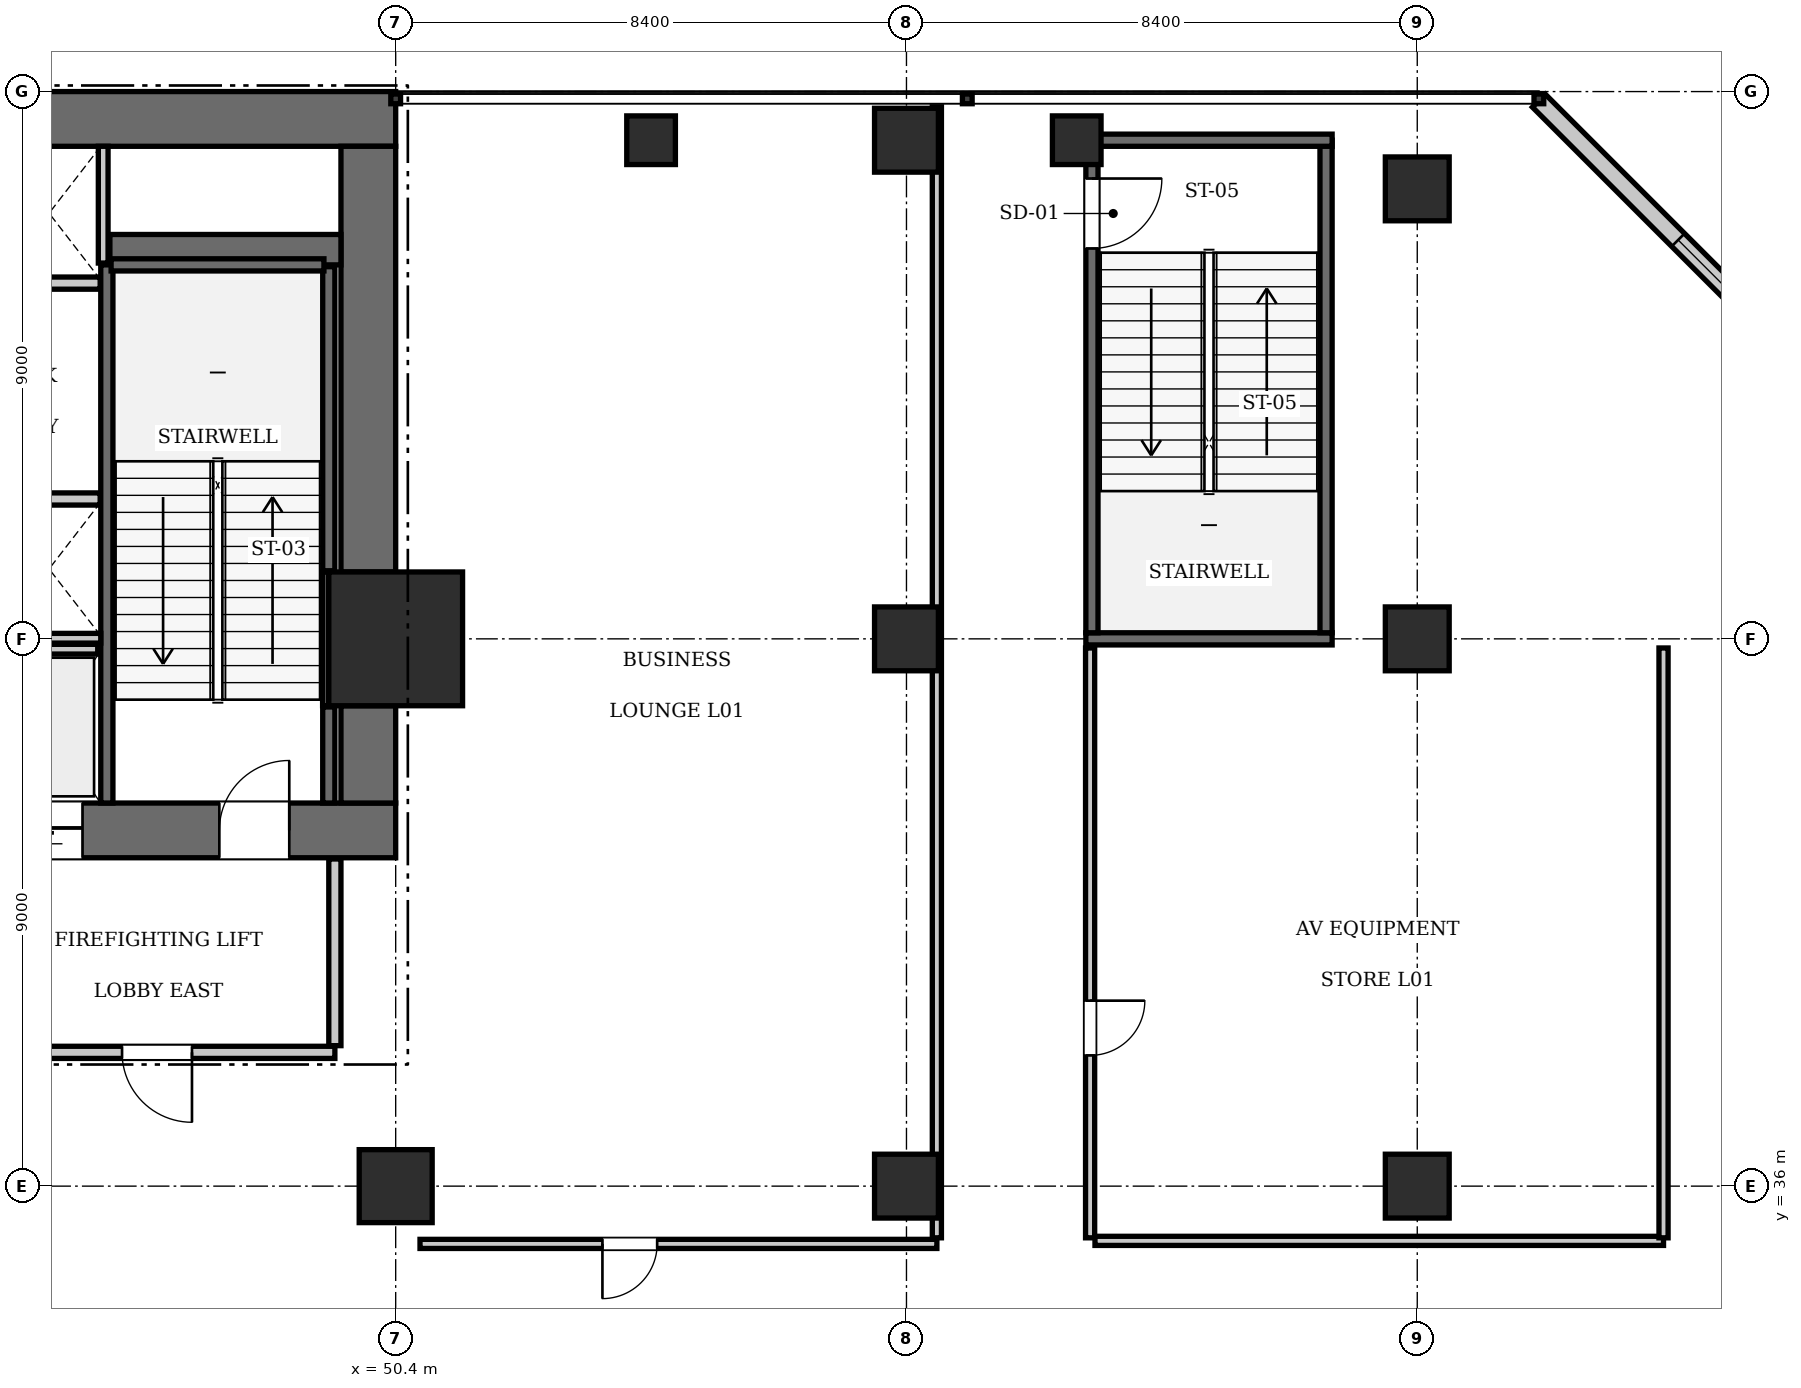
"""IFC4 building model, lengths in metres.
Left out: names, types, materials, properties, quantities, classifications, styles, units other than length and angle.
Written with IfcOpenShell. Run it as: python <this file> out.ifc"""

import sys

from ifc_helpers import new_model, si_unit, direction, frame, frame_2d, origin, origin_2d, place, context, subcontext, project, spatial, rectangle, extrude, element, fill, save


model = new_model("IFC4")
c1 = context("Model", 3, precision=1e-05, world=origin(), true_north=direction((0.0, 1.0)))
c2 = subcontext(c1, "Body", "Model", "MODEL_VIEW")
j1 = project(units=[si_unit("LENGTHUNIT", "METRE"), si_unit("PLANEANGLEUNIT", "RADIAN")], contexts=[c1])
p1 = place(None, origin())
s1 = spatial("IfcSite", under=j1, at=p1, CompositionType="ELEMENT")
p2 = place(p1, origin())
s2 = spatial("IfcBuilding", under=s1, at=p2, CompositionType="ELEMENT")
p3 = place(p2, frame((0.0, 0.0, 5.6)))
s3 = spatial("IfcBuildingStorey", under=s2, at=p3, CompositionType="ELEMENT", Elevation=5.6)
p4 = place(p3, frame((50.4, 45.0, 0.0), z_axis=(0.0, 0.0, 1.0), x_axis=(1.0, 0.0, 0.0)))
e1 = element("IfcColumn", 1, at=p4, inside=s3, PredefinedType="COLUMN", context=c2, shape_type="SweptSolid", body=[
    extrude(rectangle(XDim=2.2, YDim=2.2, at=origin_2d()), origin(), (0.0, 0.0, 1.0), 5.25),
])
p5 = place(p3, frame((25.2, 53.55, 0.0), z_axis=(0.0, 0.0, 1.0), x_axis=(1.0, 0.0, 0.0)))
e2 = element("IfcWall", 2, at=p5, inside=s3, PredefinedType="SHEAR", context=c2, shape_type="SweptSolid", body=[
    extrude(rectangle(XDim=25.2, YDim=0.9, at=frame_2d((12.6, 0.0))), origin(), (0.0, 0.0, 1.0), 5.25),
])
p6 = place(p3, frame((43.6, 41.85, 0.0), z_axis=(0.0, 0.0, 1.0), x_axis=(1.0, 0.0, 0.0)))
e3 = element("IfcWall", 3, at=p6, inside=s3, PredefinedType="SHEAR", context=c2, shape_type="SweptSolid", body=[
    extrude(rectangle(XDim=6.8, YDim=0.9, at=frame_2d((3.4, 0.0))), origin(), (0.0, 0.0, 1.0), 5.25),
])
p7 = place(p6, frame((3.9, 0.0, 0.0)))
e4 = element("IfcOpeningElement", 4, at=p7, cuts=e3, PredefinedType="OPENING", context=c2, shape_type="SweptSolid", body=[
    extrude(rectangle(XDim=1.15, YDim=2.15, at=frame_2d((0.575, 1.075))), frame((0.0, 0.46, 0.0), z_axis=(0.0, -1.0, 0.0), x_axis=(1.0, 0.0, 0.0)), (0.0, 0.0, 1.0), 0.92),
])
p8 = place(p6, frame((0.55, 0.0, 0.0)))
e5 = element("IfcOpeningElement", 5, at=p8, cuts=e3, PredefinedType="OPENING", context=c2, shape_type="SweptSolid", body=[
    extrude(rectangle(XDim=1.1, YDim=2.2, at=frame_2d((0.55, 1.1))), frame((0.0, 0.46, 0.0), z_axis=(0.0, -1.0, 0.0), x_axis=(1.0, 0.0, 0.0)), (0.0, 0.0, 1.0), 0.92),
])
p9 = place(p3, frame((49.95, 42.3, 0.0), z_axis=(0.0, 0.0, 1.0), x_axis=(0.0, 1.0, 0.0)))
e6 = element("IfcWall", 6, at=p9, inside=s3, PredefinedType="SHEAR", context=c2, shape_type="SweptSolid", body=[
    extrude(rectangle(XDim=1.6, YDim=0.9, at=frame_2d((0.8, 0.0))), origin(), (0.0, 0.0, 1.0), 5.25),
])
p10 = place(p3, frame((49.95, 46.1, 0.0), z_axis=(0.0, 0.0, 1.0), x_axis=(0.0, 1.0, 0.0)))
e7 = element("IfcWall", 7, at=p10, inside=s3, PredefinedType="SHEAR", context=c2, shape_type="SweptSolid", body=[
    extrude(rectangle(XDim=7.0, YDim=0.9, at=frame_2d((3.5, 0.0))), origin(), (0.0, 0.0, 1.0), 5.25),
])
p11 = place(p3, frame((45.7, 51.4, 0.0), z_axis=(0.0, 0.0, 1.0), x_axis=(1.0, 0.0, 0.0)))
e8 = element("IfcWall", 8, at=p11, inside=s3, PredefinedType="SHEAR", context=c2, shape_type="SweptSolid", body=[
    extrude(rectangle(XDim=3.8, YDim=0.5, at=frame_2d((1.9, 0.0))), origin(), (0.0, 0.0, 1.0), 5.25),
])
p12 = place(p3, frame((50.4, 36.0, 0.0), z_axis=(0.0, 0.0, 1.0), x_axis=(1.0, 0.0, 0.0)))
e9 = element("IfcColumn", 9, at=p12, inside=s3, PredefinedType="COLUMN", context=c2, shape_type="SweptSolid", body=[
    extrude(rectangle(XDim=1.2, YDim=1.2, at=origin_2d()), origin(), (0.0, 0.0, 1.0), 5.25),
])
for number, where, z_axis, x_axis in (
    (10, (58.8, 36.0, 0.0), (0.0, 0.0, 1.0), (1.0, 0.0, 0.0)),
    (11, (58.8, 45.0, 0.0), (0.0, 0.0, 1.0), (1.0, 0.0, 0.0)),
    (12, (67.2, 36.0, 0.0), (0.0, 0.0, 1.0), (1.0, 0.0, 0.0)),
    (13, (67.2, 45.0, 0.0), (0.0, 0.0, 1.0), (1.0, 0.0, 0.0)),
    (14, (67.2, 52.4, 0.0), (0.0, 0.0, 1.0), (1.0, 0.0, 0.0)),
    (15, (58.8, 53.2, 0.0), (0.0, 0.0, 1.0), (1.0, 0.0, 0.0)),
):
    element("IfcColumn", number, at=place(p3, frame(where, z_axis=z_axis, x_axis=x_axis)), inside=s3, PredefinedType="COLUMN", context=c2, shape_type="SweptSolid", body=[
        extrude(rectangle(XDim=1.05, YDim=1.05, at=origin_2d()), origin(), (0.0, 0.0, 1.0), 5.25),
    ])
for number, where, z_axis, x_axis in (
    (16, (54.6, 53.2, 0.0), (0.0, 0.0, 1.0), (1.0, 0.0, 0.0)),
    (17, (61.6, 53.2, 0.0), (0.0, 0.0, 1.0), (1.0, 0.0, 0.0)),
):
    element("IfcColumn", number, at=place(p3, frame(where, z_axis=z_axis, x_axis=x_axis)), inside=s3, PredefinedType="PILASTER", context=c2, shape_type="SweptSolid", body=[
        extrude(rectangle(XDim=0.8, YDim=0.8, at=origin_2d()), origin(), (0.0, 0.0, 1.0), 5.25),
    ])
p13 = place(p3, frame((45.65, 42.3, 0.0), z_axis=(0.0, 0.0, 1.0), x_axis=(0.0, 1.0, 0.0)))
e18 = element("IfcWall", 18, at=p13, inside=s3, PredefinedType="SOLIDWALL", context=c2, shape_type="SweptSolid", body=[
    extrude(rectangle(XDim=8.85, YDim=0.2, at=frame_2d((4.425, 0.0))), origin(), (0.0, 0.0, 1.0), 4.97),
])
p14 = place(p3, frame((49.3, 42.3, 0.0), z_axis=(0.0, 0.0, 1.0), x_axis=(0.0, 1.0, 0.0)))
e19 = element("IfcWall", 19, at=p14, inside=s3, PredefinedType="SOLIDWALL", context=c2, shape_type="SweptSolid", body=[
    extrude(rectangle(XDim=1.58, YDim=0.2, at=frame_2d((0.79, 0.0))), origin(), (0.0, 0.0, 1.0), 4.97),
])
p15 = place(p3, frame((49.3, 46.12, 0.0), z_axis=(0.0, 0.0, 1.0), x_axis=(0.0, 1.0, 0.0)))
e20 = element("IfcWall", 20, at=p15, inside=s3, PredefinedType="SOLIDWALL", context=c2, shape_type="SweptSolid", body=[
    extrude(rectangle(XDim=5.0, YDim=0.2, at=frame_2d((2.5, 0.0))), origin(), (0.0, 0.0, 1.0), 4.97),
])
p16 = place(p3, frame((45.72, 51.15, 0.0), z_axis=(0.0, 0.0, 1.0), x_axis=(1.0, 0.0, 0.0)))
e21 = element("IfcWall", 21, at=p16, inside=s3, PredefinedType="SOLIDWALL", context=c2, shape_type="SweptSolid", body=[
    extrude(rectangle(XDim=3.5, YDim=0.2, at=frame_2d((1.75, 0.0))), origin(), (0.0, 0.0, 1.0), 4.97),
])
p17 = place(p3, frame((49.248, 43.9, 0.0), z_axis=(0.0, 0.0, 1.0), x_axis=(0.0, 1.0, 0.0)))
e22 = element("IfcWall", 22, at=p17, inside=s3, PredefinedType="SOLIDWALL", context=c2, shape_type="SweptSolid", body=[
    extrude(rectangle(XDim=2.2, YDim=0.1, at=frame_2d((1.1, 0.0))), origin(), (0.0, 0.0, 1.0), 4.97),
])
p18 = place(p3, frame((61.75, 45.0, 0.0), z_axis=(0.0, 0.0, 1.0), x_axis=(1.0, 0.0, 0.0)))
e23 = element("IfcWall", 23, at=p18, inside=s3, PredefinedType="SOLIDWALL", context=c2, shape_type="SweptSolid", body=[
    extrude(rectangle(XDim=4.05, YDim=0.2, at=frame_2d((2.025, 0.0))), origin(), (0.0, 0.0, 1.0), 4.335),
])
p19 = place(p3, frame((61.85, 45.1, 0.0), z_axis=(0.0, 0.0, 1.0), x_axis=(0.0, 1.0, 0.0)))
e24 = element("IfcWall", 24, at=p19, inside=s3, PredefinedType="SOLIDWALL", context=c2, shape_type="SweptSolid", body=[
    extrude(rectangle(XDim=8.1, YDim=0.2, at=frame_2d((4.05, 0.0))), origin(), (0.0, 0.0, 1.0), 4.97),
])
p20 = place(p19, frame((6.32, 0.0, 0.0)))
e25 = element("IfcOpeningElement", 25, at=p20, cuts=e24, PredefinedType="OPENING", context=c2, shape_type="SweptSolid", body=[
    extrude(rectangle(XDim=1.15, YDim=2.15, at=frame_2d((0.575, 1.075))), frame((0.0, 0.11, 0.0), z_axis=(0.0, -1.0, 0.0), x_axis=(1.0, 0.0, 0.0)), (0.0, 0.0, 1.0), 0.22),
])
p21 = place(p3, frame((65.7, 45.1, 0.0), z_axis=(0.0, 0.0, 1.0), x_axis=(0.0, 1.0, 0.0)))
e26 = element("IfcWall", 26, at=p21, inside=s3, PredefinedType="SOLIDWALL", context=c2, shape_type="SweptSolid", body=[
    extrude(rectangle(XDim=8.1, YDim=0.2, at=frame_2d((4.05, 0.0))), origin(), (0.0, 0.0, 1.0), 4.97),
])
p22 = place(p3, frame((61.75, 53.2, 0.0), z_axis=(0.0, 0.0, 1.0), x_axis=(1.0, 0.0, 0.0)))
e27 = element("IfcWall", 27, at=p22, inside=s3, PredefinedType="SOLIDWALL", context=c2, shape_type="SweptSolid", body=[
    extrude(rectangle(XDim=4.05, YDim=0.2, at=frame_2d((2.025, 0.0))), origin(), (0.0, 0.0, 1.0), 4.97),
])
for number, where, z_axis, x_axis in (
    (28, (43.86, 47.3, 0.0), (0.0, 0.0, 1.0), (1.0, 0.0, 0.0)),
    (29, (43.86, 50.85, 0.0), (0.0, 0.0, 1.0), (1.0, 0.0, 0.0)),
):
    element("IfcWall", number, at=place(p3, frame(where, z_axis=z_axis, x_axis=x_axis)), inside=s3, PredefinedType="SOLIDWALL", context=c2, shape_type="SweptSolid", body=[
        extrude(rectangle(XDim=1.68, YDim=0.2, at=frame_2d((0.84, 0.0))), origin(), (0.0, 0.0, 1.0), 4.97),
    ])
p23 = place(p3, frame((43.9, 44.83, 0.0), z_axis=(0.0, 0.0, 1.0), x_axis=(1.0, 0.0, 0.0)))
e30 = element("IfcWall", 30, at=p23, inside=s3, PredefinedType="SOLIDWALL", context=c2, shape_type="SweptSolid", body=[
    extrude(rectangle(XDim=1.6, YDim=0.16, at=frame_2d((0.8, 0.0))), origin(), (0.0, 0.0, 1.0), 4.97),
])
p24 = place(p3, frame((42.1, 45.01, 0.0), z_axis=(0.0, 0.0, 1.0), x_axis=(1.0, 0.0, 0.0)))
e31 = element("IfcWall", 31, at=p24, inside=s3, PredefinedType="SOLIDWALL", context=c2, shape_type="SweptSolid", body=[
    extrude(rectangle(XDim=3.45, YDim=0.16, at=frame_2d((1.725, 0.0))), origin(), (0.0, 0.0, 1.0), 4.97),
])
p25 = place(p3, frame((45.59, 51.18, 0.0), z_axis=(0.0, 0.0, 1.0), x_axis=(0.0, 1.0, 0.0)))
e32 = element("IfcWall", 32, at=p25, inside=s3, PredefinedType="SOLIDWALL", context=c2, shape_type="SweptSolid", body=[
    extrude(rectangle(XDim=1.92, YDim=0.16, at=frame_2d((0.96, 0.0))), origin(), (0.0, 0.0, 1.0), 4.97),
])
p26 = place(p3, frame((75.45, 47.6, 0.0), z_axis=(0.0, 0.0, 1.0), x_axis=(-0.707106781187, 0.707106781187, 0.0)))
e33 = element("IfcWall", 33, at=p26, inside=s3, PredefinedType="SOLIDWALL", context=c2, shape_type="SweptSolid", body=[
    extrude(rectangle(XDim=8.839, YDim=0.3, at=frame_2d((4.419, 0.0))), origin(), (0.0, 0.0, 1.0), 4.97),
])
p27 = place(p26, frame((3.2, 0.0, 0.9)))
e34 = element("IfcOpeningElement", 34, at=p27, cuts=e33, PredefinedType="OPENING", context=c2, shape_type="SweptSolid", body=[
    extrude(rectangle(XDim=2.4, YDim=2.6, at=frame_2d((1.2, 1.3))), frame((0.0, 0.16, 0.0), z_axis=(0.0, -1.0, 0.0), x_axis=(1.0, 0.0, 0.0)), (0.0, 0.0, 1.0), 0.32),
])
p28 = place(p3, frame((43.6, 38.2, 0.0), z_axis=(0.0, 0.0, 1.0), x_axis=(1.0, 0.0, 0.0)))
e35 = element("IfcWall", 35, at=p28, inside=s3, PredefinedType="PARTITIONING", context=c2, shape_type="SweptSolid", body=[
    extrude(rectangle(XDim=5.8, YDim=0.2, at=frame_2d((2.9, 0.0))), origin(), (0.0, 0.0, 1.0), 4.97),
])
p29 = place(p28, frame((2.3, 0.0, 0.0)))
e36 = element("IfcOpeningElement", 36, at=p29, cuts=e35, PredefinedType="OPENING", context=c2, shape_type="SweptSolid", body=[
    extrude(rectangle(XDim=1.15, YDim=2.15, at=frame_2d((0.575, 1.075))), frame((0.0, 0.11, 0.0), z_axis=(0.0, -1.0, 0.0), x_axis=(1.0, 0.0, 0.0)), (0.0, 0.0, 1.0), 0.22),
])
p30 = place(p3, frame((49.4, 38.31, 0.0), z_axis=(0.0, 0.0, 1.0), x_axis=(0.0, 1.0, 0.0)))
e37 = element("IfcWall", 37, at=p30, inside=s3, PredefinedType="PARTITIONING", context=c2, shape_type="SweptSolid", body=[
    extrude(rectangle(XDim=3.07, YDim=0.2, at=frame_2d((1.535, 0.0))), origin(), (0.0, 0.0, 1.0), 4.97),
])
p31 = place(p3, frame((50.8, 35.05, 0.0), z_axis=(0.0, 0.0, 1.0), x_axis=(1.0, 0.0, 0.0)))
e38 = element("IfcWall", 38, at=p31, inside=s3, PredefinedType="PARTITIONING", context=c2, shape_type="SweptSolid", body=[
    extrude(rectangle(XDim=8.5, YDim=0.15, at=frame_2d((4.25, 0.0))), origin(), (0.0, 0.0, 1.0), 4.97),
])
p32 = place(p31, frame((3.0, 0.0, 0.0)))
e39 = element("IfcOpeningElement", 39, at=p32, cuts=e38, PredefinedType="OPENING", context=c2, shape_type="SweptSolid", body=[
    extrude(rectangle(XDim=0.9, YDim=2.1, at=frame_2d((0.45, 1.05))), frame((0.0, 0.085, 0.0), z_axis=(0.0, -1.0, 0.0), x_axis=(1.0, 0.0, 0.0)), (0.0, 0.0, 1.0), 0.17),
])
p33 = place(p3, frame((59.3, 35.15, 0.0), z_axis=(0.0, 0.0, 1.0), x_axis=(0.0, 1.0, 0.0)))
e40 = element("IfcWall", 40, at=p33, inside=s3, PredefinedType="PARTITIONING", context=c2, shape_type="SweptSolid", body=[
    extrude(rectangle(XDim=18.6, YDim=0.15, at=frame_2d((9.3, 0.0))), origin(), (0.0, 0.0, 1.0), 4.97),
])
p34 = place(p3, frame((61.82, 35.15, 0.0), z_axis=(0.0, 0.0, 1.0), x_axis=(0.0, 1.0, 0.0)))
e41 = element("IfcWall", 41, at=p34, inside=s3, PredefinedType="PARTITIONING", context=c2, shape_type="SweptSolid", body=[
    extrude(rectangle(XDim=9.7, YDim=0.15, at=frame_2d((4.85, 0.0))), origin(), (0.0, 0.0, 1.0), 4.97),
])
p35 = place(p34, frame((3.0, 0.0, 0.0)))
e42 = element("IfcOpeningElement", 42, at=p35, cuts=e41, PredefinedType="OPENING", context=c2, shape_type="SweptSolid", body=[
    extrude(rectangle(XDim=0.9, YDim=2.1, at=frame_2d((0.45, 1.05))), frame((0.0, 0.085, 0.0), z_axis=(0.0, -1.0, 0.0), x_axis=(1.0, 0.0, 0.0)), (0.0, 0.0, 1.0), 0.17),
])
p36 = place(p3, frame((61.9, 35.1, 0.0), z_axis=(0.0, 0.0, 1.0), x_axis=(1.0, 0.0, 0.0)))
e43 = element("IfcWall", 43, at=p36, inside=s3, PredefinedType="PARTITIONING", context=c2, shape_type="SweptSolid", body=[
    extrude(rectangle(XDim=9.35, YDim=0.15, at=frame_2d((4.675, 0.0))), origin(), (0.0, 0.0, 1.0), 4.97),
])
p37 = place(p3, frame((71.25, 35.15, 0.0), z_axis=(0.0, 0.0, 1.0), x_axis=(0.0, 1.0, 0.0)))
e44 = element("IfcWall", 44, at=p37, inside=s3, PredefinedType="PARTITIONING", context=c2, shape_type="SweptSolid", body=[
    extrude(rectangle(XDim=9.7, YDim=0.15, at=frame_2d((4.85, 0.0))), origin(), (0.0, 0.0, 1.0), 4.97),
])
p38 = place(p7, origin())
e45 = element("IfcDoor", 45, at=p38, inside=s3, OperationType="SINGLE_SWING_RIGHT", PredefinedType="DOOR", context=c2, shape_type="SweptSolid", body=[
    extrude(rectangle(XDim=1.15, YDim=2.15, at=frame_2d((0.575, 1.075))), frame((0.0, 0.025, 0.0), z_axis=(0.0, -1.0, 0.0), x_axis=(1.0, 0.0, 0.0)), (0.0, 0.0, 1.0), 0.05),
])
fill(e4, e45)
p39 = place(p20, frame((1.15, 0.0, 0.0), z_axis=(0.0, 0.0, 1.0), x_axis=(-1.0, 0.0, 0.0)))
e46 = element("IfcDoor", 46, at=p39, inside=s3, OperationType="SINGLE_SWING_LEFT", PredefinedType="DOOR", context=c2, shape_type="SweptSolid", body=[
    extrude(rectangle(XDim=1.15, YDim=2.15, at=frame_2d((0.575, 1.075))), frame((0.0, 0.025, 0.0), z_axis=(0.0, -1.0, 0.0), x_axis=(1.0, 0.0, 0.0)), (0.0, 0.0, 1.0), 0.05),
])
fill(e25, e46)
p40 = place(p8, frame((1.1, 0.0, 0.0), z_axis=(0.0, 0.0, 1.0), x_axis=(-1.0, 0.0, 0.0)))
e47 = element("IfcDoor", 47, at=p40, inside=s3, OperationType="SLIDING_TO_LEFT", PredefinedType="DOOR", context=c2, shape_type="SweptSolid", body=[
    extrude(rectangle(XDim=1.1, YDim=2.2, at=frame_2d((0.55, 1.1))), frame((0.0, 0.025, 0.0), z_axis=(0.0, -1.0, 0.0), x_axis=(1.0, 0.0, 0.0)), (0.0, 0.0, 1.0), 0.05),
])
fill(e5, e47)
p41 = place(p27, origin())
e48 = element("IfcWindow", 48, at=p41, inside=s3, PartitioningType="SINGLE_PANEL", PredefinedType="WINDOW", context=c2, shape_type="SweptSolid", body=[
    extrude(rectangle(XDim=2.4, YDim=2.6, at=frame_2d((1.2, 1.3))), frame((0.0, 0.03, 0.0), z_axis=(0.0, -1.0, 0.0), x_axis=(1.0, 0.0, 0.0)), (0.0, 0.0, 1.0), 0.06),
])
fill(e34, e48)
p42 = place(p29, frame((1.15, 0.0, 0.0), z_axis=(0.0, 0.0, 1.0), x_axis=(-1.0, 0.0, 0.0)))
e49 = element("IfcDoor", 49, at=p42, inside=s3, OperationType="SINGLE_SWING_LEFT", PredefinedType="DOOR", context=c2, shape_type="SweptSolid", body=[
    extrude(rectangle(XDim=1.15, YDim=2.15, at=frame_2d((0.575, 1.075))), frame((0.0, 0.025, 0.0), z_axis=(0.0, -1.0, 0.0), x_axis=(1.0, 0.0, 0.0)), (0.0, 0.0, 1.0), 0.05),
])
fill(e36, e49)
p43 = place(p32, frame((0.9, 0.0, 0.0), z_axis=(0.0, 0.0, 1.0), x_axis=(-1.0, 0.0, 0.0)))
e50 = element("IfcDoor", 50, at=p43, inside=s3, OperationType="SINGLE_SWING_RIGHT", PredefinedType="DOOR", context=c2, shape_type="SweptSolid", body=[
    extrude(rectangle(XDim=0.9, YDim=2.1, at=frame_2d((0.45, 1.05))), frame((0.0, 0.025, 0.0), z_axis=(0.0, -1.0, 0.0), x_axis=(1.0, 0.0, 0.0)), (0.0, 0.0, 1.0), 0.05),
])
fill(e39, e50)
p44 = place(p35, frame((0.9, 0.0, 0.0), z_axis=(0.0, 0.0, 1.0), x_axis=(-1.0, 0.0, 0.0)))
e51 = element("IfcDoor", 51, at=p44, inside=s3, OperationType="SINGLE_SWING_LEFT", PredefinedType="DOOR", context=c2, shape_type="SweptSolid", body=[
    extrude(rectangle(XDim=0.9, YDim=2.1, at=frame_2d((0.45, 1.05))), frame((0.0, 0.025, 0.0), z_axis=(0.0, -1.0, 0.0), x_axis=(1.0, 0.0, 0.0)), (0.0, 0.0, 1.0), 0.05),
])
fill(e42, e51)
save(model, sys.argv[1])
